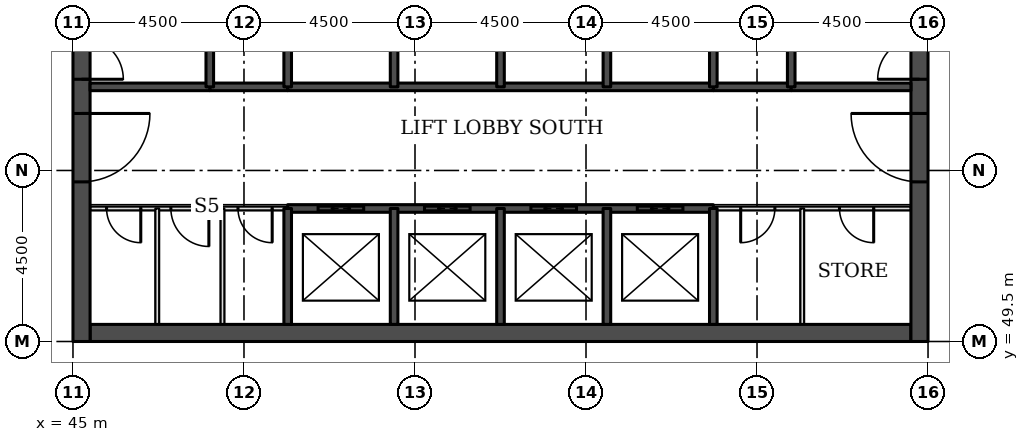
"""IFC4 building model, lengths in metres.
Left out: names, types, materials, properties, quantities, classifications, styles, units other than length and angle.
Written with IfcOpenShell. Run it as: python <this file> out.ifc"""

import sys

from ifc_helpers import new_model, si_unit, direction, frame, frame_2d, origin, place, context, subcontext, project, spatial, rectangle, extrude, element, fill, save


model = new_model("IFC4")
c1 = context("Model", 3, precision=1e-05, world=origin(), true_north=direction((0.0, 1.0)))
c2 = subcontext(c1, "Body", "Model", "MODEL_VIEW")
j1 = project(units=[si_unit("LENGTHUNIT", "METRE"), si_unit("PLANEANGLEUNIT", "RADIAN")], contexts=[c1])
p1 = place(None, origin())
s1 = spatial("IfcSite", under=j1, at=p1, CompositionType="ELEMENT")
p2 = place(p1, origin())
s2 = spatial("IfcBuilding", under=s1, at=p2, CompositionType="ELEMENT")
p3 = place(p2, frame((0.0, 0.0, 127.0)))
s3 = spatial("IfcBuildingStorey", under=s2, at=p3, CompositionType="ELEMENT", Elevation=127.0)
p4 = place(p3, frame((45.45, 49.725, 0.0), z_axis=(0.0, 0.0, 1.0), x_axis=(1.0, 0.0, 0.0)))
e1 = element("IfcWall", 1, at=p4, inside=s3, PredefinedType="SHEAR", context=c2, shape_type="SweptSolid", body=[
    extrude(rectangle(XDim=21.6, YDim=0.45, at=frame_2d((10.8, 0.0))), origin(), (0.0, 0.0, 1.0), 3.7),
])
p5 = place(p3, frame((45.225, 49.5, 0.0), z_axis=(0.0, 0.0, 1.0), x_axis=(0.0, 1.0, 0.0)))
e2 = element("IfcWall", 2, at=p5, inside=s3, PredefinedType="SHEAR", context=c2, shape_type="SweptSolid", body=[
    extrude(rectangle(XDim=22.5, YDim=0.45, at=frame_2d((11.25, 0.0))), origin(), (0.0, 0.0, 1.0), 3.7),
])
p6 = place(p5, frame((4.2, 0.0, 0.0)))
e3 = element("IfcOpeningElement", 3, at=p6, cuts=e2, PredefinedType="OPENING", context=c2, shape_type="SweptSolid", body=[
    extrude(rectangle(XDim=1.8, YDim=2.1, at=frame_2d((0.9, 1.05))), frame((0.0, 0.235, 0.0), z_axis=(0.0, -1.0, 0.0), x_axis=(1.0, 0.0, 0.0)), (0.0, 0.0, 1.0), 0.47),
])
p7 = place(p5, frame((6.9, 0.0, 0.0)))
e4 = element("IfcOpeningElement", 4, at=p7, cuts=e2, PredefinedType="OPENING", context=c2, shape_type="SweptSolid", body=[
    extrude(rectangle(XDim=1.1, YDim=2.1, at=frame_2d((0.55, 1.05))), frame((0.0, 0.235, 0.0), z_axis=(0.0, -1.0, 0.0), x_axis=(1.0, 0.0, 0.0)), (0.0, 0.0, 1.0), 0.47),
])
p8 = place(p5, frame((13.6, 0.0, 0.0)))
e5 = element("IfcOpeningElement", 5, at=p8, cuts=e2, PredefinedType="OPENING", context=c2, shape_type="SweptSolid", body=[
    extrude(rectangle(XDim=1.1, YDim=2.1, at=frame_2d((0.55, 1.05))), frame((0.0, 0.235, 0.0), z_axis=(0.0, -1.0, 0.0), x_axis=(1.0, 0.0, 0.0)), (0.0, 0.0, 1.0), 0.47),
])
p9 = place(p5, frame((16.5, 0.0, 0.0)))
e6 = element("IfcOpeningElement", 6, at=p9, cuts=e2, PredefinedType="OPENING", context=c2, shape_type="SweptSolid", body=[
    extrude(rectangle(XDim=1.8, YDim=2.1, at=frame_2d((0.9, 1.05))), frame((0.0, 0.235, 0.0), z_axis=(0.0, -1.0, 0.0), x_axis=(1.0, 0.0, 0.0)), (0.0, 0.0, 1.0), 0.47),
])
p10 = place(p3, frame((67.275, 49.5, 0.0), z_axis=(0.0, 0.0, 1.0), x_axis=(0.0, 1.0, 0.0)))
e7 = element("IfcWall", 7, at=p10, inside=s3, PredefinedType="SHEAR", context=c2, shape_type="SweptSolid", body=[
    extrude(rectangle(XDim=22.5, YDim=0.45, at=frame_2d((11.25, 0.0))), origin(), (0.0, 0.0, 1.0), 3.7),
])
p11 = place(p10, frame((4.2, 0.0, 0.0)))
e8 = element("IfcOpeningElement", 8, at=p11, cuts=e7, PredefinedType="OPENING", context=c2, shape_type="SweptSolid", body=[
    extrude(rectangle(XDim=1.8, YDim=2.1, at=frame_2d((0.9, 1.05))), frame((0.0, 0.235, 0.0), z_axis=(0.0, -1.0, 0.0), x_axis=(1.0, 0.0, 0.0)), (0.0, 0.0, 1.0), 0.47),
])
p12 = place(p10, frame((6.9, 0.0, 0.0)))
e9 = element("IfcOpeningElement", 9, at=p12, cuts=e7, PredefinedType="OPENING", context=c2, shape_type="SweptSolid", body=[
    extrude(rectangle(XDim=1.1, YDim=2.1, at=frame_2d((0.55, 1.05))), frame((0.0, 0.235, 0.0), z_axis=(0.0, -1.0, 0.0), x_axis=(1.0, 0.0, 0.0)), (0.0, 0.0, 1.0), 0.47),
])
p13 = place(p10, frame((13.6, 0.0, 0.0)))
e10 = element("IfcOpeningElement", 10, at=p13, cuts=e7, PredefinedType="OPENING", context=c2, shape_type="SweptSolid", body=[
    extrude(rectangle(XDim=1.1, YDim=2.1, at=frame_2d((0.55, 1.05))), frame((0.0, 0.235, 0.0), z_axis=(0.0, -1.0, 0.0), x_axis=(1.0, 0.0, 0.0)), (0.0, 0.0, 1.0), 0.47),
])
p14 = place(p10, frame((16.5, 0.0, 0.0)))
e11 = element("IfcOpeningElement", 11, at=p14, cuts=e7, PredefinedType="OPENING", context=c2, shape_type="SweptSolid", body=[
    extrude(rectangle(XDim=1.8, YDim=2.1, at=frame_2d((0.9, 1.05))), frame((0.0, 0.235, 0.0), z_axis=(0.0, -1.0, 0.0), x_axis=(1.0, 0.0, 0.0)), (0.0, 0.0, 1.0), 0.47),
])
p15 = place(p3, frame((45.45, 53.0, 0.0), z_axis=(0.0, 0.0, 1.0), x_axis=(1.0, 0.0, 0.0)))
e12 = element("IfcWall", 12, at=p15, inside=s3, PredefinedType="PARTITIONING", context=c2, shape_type="SweptSolid", body=[
    extrude(rectangle(XDim=5.2, YDim=0.1, at=frame_2d((2.6, 0.0))), origin(), (0.0, 0.0, 1.0), 3.55),
])
p16 = place(p15, frame((0.434, 0.0, 0.0)))
e13 = element("IfcOpeningElement", 13, at=p16, cuts=e12, PredefinedType="OPENING", context=c2, shape_type="SweptSolid", body=[
    extrude(rectangle(XDim=0.9, YDim=2.1, at=frame_2d((0.45, 1.05))), frame((0.0, 0.06, 0.0), z_axis=(0.0, -1.0, 0.0), x_axis=(1.0, 0.0, 0.0)), (0.0, 0.0, 1.0), 0.12),
])
p17 = place(p15, frame((2.126, 0.0, 0.0)))
e14 = element("IfcOpeningElement", 14, at=p17, cuts=e12, PredefinedType="OPENING", context=c2, shape_type="SweptSolid", body=[
    extrude(rectangle(XDim=1.0, YDim=2.1, at=frame_2d((0.5, 1.05))), frame((0.0, 0.06, 0.0), z_axis=(0.0, -1.0, 0.0), x_axis=(1.0, 0.0, 0.0)), (0.0, 0.0, 1.0), 0.12),
])
p18 = place(p15, frame((3.892, 0.0, 0.0)))
e15 = element("IfcOpeningElement", 15, at=p18, cuts=e12, PredefinedType="OPENING", context=c2, shape_type="SweptSolid", body=[
    extrude(rectangle(XDim=0.9, YDim=2.1, at=frame_2d((0.45, 1.05))), frame((0.0, 0.06, 0.0), z_axis=(0.0, -1.0, 0.0), x_axis=(1.0, 0.0, 0.0)), (0.0, 0.0, 1.0), 0.12),
])
p19 = place(p3, frame((61.85, 53.0, 0.0), z_axis=(0.0, 0.0, 1.0), x_axis=(1.0, 0.0, 0.0)))
e16 = element("IfcWall", 16, at=p19, inside=s3, PredefinedType="PARTITIONING", context=c2, shape_type="SweptSolid", body=[
    extrude(rectangle(XDim=5.2, YDim=0.1, at=frame_2d((2.6, 0.0))), origin(), (0.0, 0.0, 1.0), 3.55),
])
p20 = place(p19, frame((3.32, 0.0, 0.0)))
e17 = element("IfcOpeningElement", 17, at=p20, cuts=e16, PredefinedType="OPENING", context=c2, shape_type="SweptSolid", body=[
    extrude(rectangle(XDim=0.9, YDim=2.1, at=frame_2d((0.45, 1.05))), frame((0.0, 0.06, 0.0), z_axis=(0.0, -1.0, 0.0), x_axis=(1.0, 0.0, 0.0)), (0.0, 0.0, 1.0), 0.12),
])
p21 = place(p19, frame((0.72, 0.0, 0.0)))
e18 = element("IfcOpeningElement", 18, at=p21, cuts=e16, PredefinedType="OPENING", context=c2, shape_type="SweptSolid", body=[
    extrude(rectangle(XDim=0.9, YDim=2.1, at=frame_2d((0.45, 1.05))), frame((0.0, 0.06, 0.0), z_axis=(0.0, -1.0, 0.0), x_axis=(1.0, 0.0, 0.0)), (0.0, 0.0, 1.0), 0.12),
])
p22 = place(p3, frame((50.65, 53.0, 0.0), z_axis=(0.0, 0.0, 1.0), x_axis=(1.0, 0.0, 0.0)))
e19 = element("IfcWall", 19, at=p22, inside=s3, PredefinedType="SOLIDWALL", context=c2, shape_type="SweptSolid", body=[
    extrude(rectangle(XDim=11.2, YDim=0.2, at=frame_2d((5.6, 0.0))), origin(), (0.0, 0.0, 1.0), 3.55),
])
p23 = place(p22, frame((0.8, 0.0, 0.0)))
e20 = element("IfcOpeningElement", 20, at=p23, cuts=e19, PredefinedType="OPENING", context=c2, shape_type="SweptSolid", body=[
    extrude(rectangle(XDim=1.2, YDim=2.1, at=frame_2d((0.6, 1.05))), frame((0.0, 0.11, 0.0), z_axis=(0.0, -1.0, 0.0), x_axis=(1.0, 0.0, 0.0)), (0.0, 0.0, 1.0), 0.22),
])
p24 = place(p22, frame((3.6, 0.0, 0.0)))
e21 = element("IfcOpeningElement", 21, at=p24, cuts=e19, PredefinedType="OPENING", context=c2, shape_type="SweptSolid", body=[
    extrude(rectangle(XDim=1.2, YDim=2.1, at=frame_2d((0.6, 1.05))), frame((0.0, 0.11, 0.0), z_axis=(0.0, -1.0, 0.0), x_axis=(1.0, 0.0, 0.0)), (0.0, 0.0, 1.0), 0.22),
])
p25 = place(p22, frame((6.4, 0.0, 0.0)))
e22 = element("IfcOpeningElement", 22, at=p25, cuts=e19, PredefinedType="OPENING", context=c2, shape_type="SweptSolid", body=[
    extrude(rectangle(XDim=1.2, YDim=2.1, at=frame_2d((0.6, 1.05))), frame((0.0, 0.11, 0.0), z_axis=(0.0, -1.0, 0.0), x_axis=(1.0, 0.0, 0.0)), (0.0, 0.0, 1.0), 0.22),
])
p26 = place(p22, frame((9.2, 0.0, 0.0)))
e23 = element("IfcOpeningElement", 23, at=p26, cuts=e19, PredefinedType="OPENING", context=c2, shape_type="SweptSolid", body=[
    extrude(rectangle(XDim=1.2, YDim=2.1, at=frame_2d((0.6, 1.05))), frame((0.0, 0.11, 0.0), z_axis=(0.0, -1.0, 0.0), x_axis=(1.0, 0.0, 0.0)), (0.0, 0.0, 1.0), 0.22),
])
for number, where, z_axis, x_axis in (
    (24, (48.6, 56.2, 0.0), (0.0, 0.0, 1.0), (1.0, 0.0, 0.0)),
    (25, (61.85, 56.2, 0.0), (0.0, 0.0, 1.0), (1.0, 0.0, 0.0)),
):
    element("IfcWall", number, at=place(p3, frame(where, z_axis=z_axis, x_axis=x_axis)), inside=s3, PredefinedType="SOLIDWALL", context=c2, shape_type="SweptSolid", body=[
        extrude(rectangle(XDim=2.05, YDim=0.2, at=frame_2d((1.025, 0.0))), origin(), (0.0, 0.0, 1.0), 3.55),
    ])
p27 = place(p3, frame((45.45, 56.2, 0.0), z_axis=(0.0, 0.0, 1.0), x_axis=(1.0, 0.0, 0.0)))
e26 = element("IfcWall", 26, at=p27, inside=s3, PredefinedType="SOLIDWALL", context=c2, shape_type="SweptSolid", body=[
    extrude(rectangle(XDim=3.15, YDim=0.2, at=frame_2d((1.575, 0.0))), origin(), (0.0, 0.0, 1.0), 3.55),
])
p28 = place(p3, frame((50.65, 56.2, 0.0), z_axis=(0.0, 0.0, 1.0), x_axis=(1.0, 0.0, 0.0)))
e27 = element("IfcWall", 27, at=p28, inside=s3, PredefinedType="SOLIDWALL", context=c2, shape_type="SweptSolid", body=[
    extrude(rectangle(XDim=11.2, YDim=0.2, at=frame_2d((5.6, 0.0))), origin(), (0.0, 0.0, 1.0), 3.55),
])
p29 = place(p3, frame((63.9, 56.2, 0.0), z_axis=(0.0, 0.0, 1.0), x_axis=(1.0, 0.0, 0.0)))
e28 = element("IfcWall", 28, at=p29, inside=s3, PredefinedType="SOLIDWALL", context=c2, shape_type="SweptSolid", body=[
    extrude(rectangle(XDim=3.15, YDim=0.2, at=frame_2d((1.575, 0.0))), origin(), (0.0, 0.0, 1.0), 3.55),
])
p30 = place(p3, frame((47.218, 49.95, 0.0), z_axis=(0.0, 0.0, 1.0), x_axis=(0.0, 1.0, 0.0)))
e29 = element("IfcWall", 29, at=p30, inside=s3, PredefinedType="PARTITIONING", context=c2, shape_type="SweptSolid", body=[
    extrude(rectangle(XDim=3.05, YDim=0.1, at=frame_2d((1.525, 0.0))), origin(), (0.0, 0.0, 1.0), 3.55),
])
p31 = place(p3, frame((48.6, 56.2, 0.0), z_axis=(0.0, 0.0, 1.0), x_axis=(0.0, 1.0, 0.0)))
e30 = element("IfcWall", 30, at=p31, inside=s3, PredefinedType="SOLIDWALL", context=c2, shape_type="SweptSolid", body=[
    extrude(rectangle(XDim=5.8, YDim=0.2, at=frame_2d((2.9, 0.0))), origin(), (0.0, 0.0, 1.0), 3.55),
])
p32 = place(p3, frame((48.934, 49.95, 0.0), z_axis=(0.0, 0.0, 1.0), x_axis=(0.0, 1.0, 0.0)))
e31 = element("IfcWall", 31, at=p32, inside=s3, PredefinedType="PARTITIONING", context=c2, shape_type="SweptSolid", body=[
    extrude(rectangle(XDim=3.05, YDim=0.1, at=frame_2d((1.525, 0.0))), origin(), (0.0, 0.0, 1.0), 3.55),
])
p33 = place(p3, frame((50.65, 49.95, 0.0), z_axis=(0.0, 0.0, 1.0), x_axis=(0.0, 1.0, 0.0)))
e32 = element("IfcWall", 32, at=p33, inside=s3, PredefinedType="SOLIDWALL", context=c2, shape_type="SweptSolid", body=[
    extrude(rectangle(XDim=3.05, YDim=0.2, at=frame_2d((1.525, 0.0))), origin(), (0.0, 0.0, 1.0), 3.55),
])
p34 = place(p3, frame((50.65, 56.2, 0.0), z_axis=(0.0, 0.0, 1.0), x_axis=(0.0, 1.0, 0.0)))
e33 = element("IfcWall", 33, at=p34, inside=s3, PredefinedType="SOLIDWALL", context=c2, shape_type="SweptSolid", body=[
    extrude(rectangle(XDim=2.8, YDim=0.2, at=frame_2d((1.4, 0.0))), origin(), (0.0, 0.0, 1.0), 3.55),
])
p35 = place(p3, frame((53.45, 49.95, 0.0), z_axis=(0.0, 0.0, 1.0), x_axis=(0.0, 1.0, 0.0)))
e34 = element("IfcWall", 34, at=p35, inside=s3, PredefinedType="SOLIDWALL", context=c2, shape_type="SweptSolid", body=[
    extrude(rectangle(XDim=3.05, YDim=0.2, at=frame_2d((1.525, 0.0))), origin(), (0.0, 0.0, 1.0), 3.55),
])
p36 = place(p3, frame((53.45, 56.2, 0.0), z_axis=(0.0, 0.0, 1.0), x_axis=(0.0, 1.0, 0.0)))
e35 = element("IfcWall", 35, at=p36, inside=s3, PredefinedType="SOLIDWALL", context=c2, shape_type="SweptSolid", body=[
    extrude(rectangle(XDim=2.8, YDim=0.2, at=frame_2d((1.4, 0.0))), origin(), (0.0, 0.0, 1.0), 3.55),
])
p37 = place(p3, frame((56.25, 49.95, 0.0), z_axis=(0.0, 0.0, 1.0), x_axis=(0.0, 1.0, 0.0)))
e36 = element("IfcWall", 36, at=p37, inside=s3, PredefinedType="SOLIDWALL", context=c2, shape_type="SweptSolid", body=[
    extrude(rectangle(XDim=3.05, YDim=0.2, at=frame_2d((1.525, 0.0))), origin(), (0.0, 0.0, 1.0), 3.55),
])
p38 = place(p3, frame((56.25, 56.2, 0.0), z_axis=(0.0, 0.0, 1.0), x_axis=(0.0, 1.0, 0.0)))
e37 = element("IfcWall", 37, at=p38, inside=s3, PredefinedType="SOLIDWALL", context=c2, shape_type="SweptSolid", body=[
    extrude(rectangle(XDim=2.8, YDim=0.2, at=frame_2d((1.4, 0.0))), origin(), (0.0, 0.0, 1.0), 3.55),
])
p39 = place(p3, frame((59.05, 49.95, 0.0), z_axis=(0.0, 0.0, 1.0), x_axis=(0.0, 1.0, 0.0)))
e38 = element("IfcWall", 38, at=p39, inside=s3, PredefinedType="SOLIDWALL", context=c2, shape_type="SweptSolid", body=[
    extrude(rectangle(XDim=3.05, YDim=0.2, at=frame_2d((1.525, 0.0))), origin(), (0.0, 0.0, 1.0), 3.55),
])
p40 = place(p3, frame((59.05, 56.2, 0.0), z_axis=(0.0, 0.0, 1.0), x_axis=(0.0, 1.0, 0.0)))
e39 = element("IfcWall", 39, at=p40, inside=s3, PredefinedType="SOLIDWALL", context=c2, shape_type="SweptSolid", body=[
    extrude(rectangle(XDim=2.8, YDim=0.2, at=frame_2d((1.4, 0.0))), origin(), (0.0, 0.0, 1.0), 3.55),
])
p41 = place(p3, frame((61.85, 49.95, 0.0), z_axis=(0.0, 0.0, 1.0), x_axis=(0.0, 1.0, 0.0)))
e40 = element("IfcWall", 40, at=p41, inside=s3, PredefinedType="SOLIDWALL", context=c2, shape_type="SweptSolid", body=[
    extrude(rectangle(XDim=3.05, YDim=0.2, at=frame_2d((1.525, 0.0))), origin(), (0.0, 0.0, 1.0), 3.55),
])
p42 = place(p3, frame((61.85, 56.2, 0.0), z_axis=(0.0, 0.0, 1.0), x_axis=(0.0, 1.0, 0.0)))
e41 = element("IfcWall", 41, at=p42, inside=s3, PredefinedType="SOLIDWALL", context=c2, shape_type="SweptSolid", body=[
    extrude(rectangle(XDim=2.8, YDim=0.2, at=frame_2d((1.4, 0.0))), origin(), (0.0, 0.0, 1.0), 3.55),
])
p43 = place(p3, frame((63.9, 56.2, 0.0), z_axis=(0.0, 0.0, 1.0), x_axis=(0.0, 1.0, 0.0)))
e42 = element("IfcWall", 42, at=p43, inside=s3, PredefinedType="SOLIDWALL", context=c2, shape_type="SweptSolid", body=[
    extrude(rectangle(XDim=5.8, YDim=0.2, at=frame_2d((2.9, 0.0))), origin(), (0.0, 0.0, 1.0), 3.55),
])
p44 = place(p3, frame((64.19, 49.95, 0.0), z_axis=(0.0, 0.0, 1.0), x_axis=(0.0, 1.0, 0.0)))
e43 = element("IfcWall", 43, at=p44, inside=s3, PredefinedType="PARTITIONING", context=c2, shape_type="SweptSolid", body=[
    extrude(rectangle(XDim=3.05, YDim=0.1, at=frame_2d((1.525, 0.0))), origin(), (0.0, 0.0, 1.0), 3.55),
])
p45 = place(p23, origin())
e44 = element("IfcDoor", 44, at=p45, inside=s3, OperationType="DOUBLE_DOOR_SLIDING", PredefinedType="DOOR", context=c2, shape_type="SweptSolid", body=[
    extrude(rectangle(XDim=1.2, YDim=2.1, at=frame_2d((0.6, 1.05))), frame((0.0, 0.025, 0.0), z_axis=(0.0, -1.0, 0.0), x_axis=(1.0, 0.0, 0.0)), (0.0, 0.0, 1.0), 0.05),
])
fill(e20, e44)
p46 = place(p24, origin())
e45 = element("IfcDoor", 45, at=p46, inside=s3, OperationType="DOUBLE_DOOR_SLIDING", PredefinedType="DOOR", context=c2, shape_type="SweptSolid", body=[
    extrude(rectangle(XDim=1.2, YDim=2.1, at=frame_2d((0.6, 1.05))), frame((0.0, 0.025, 0.0), z_axis=(0.0, -1.0, 0.0), x_axis=(1.0, 0.0, 0.0)), (0.0, 0.0, 1.0), 0.05),
])
fill(e21, e45)
p47 = place(p25, origin())
e46 = element("IfcDoor", 46, at=p47, inside=s3, OperationType="DOUBLE_DOOR_SLIDING", PredefinedType="DOOR", context=c2, shape_type="SweptSolid", body=[
    extrude(rectangle(XDim=1.2, YDim=2.1, at=frame_2d((0.6, 1.05))), frame((0.0, 0.025, 0.0), z_axis=(0.0, -1.0, 0.0), x_axis=(1.0, 0.0, 0.0)), (0.0, 0.0, 1.0), 0.05),
])
fill(e22, e46)
p48 = place(p26, origin())
e47 = element("IfcDoor", 47, at=p48, inside=s3, OperationType="DOUBLE_DOOR_SLIDING", PredefinedType="DOOR", context=c2, shape_type="SweptSolid", body=[
    extrude(rectangle(XDim=1.2, YDim=2.1, at=frame_2d((0.6, 1.05))), frame((0.0, 0.025, 0.0), z_axis=(0.0, -1.0, 0.0), x_axis=(1.0, 0.0, 0.0)), (0.0, 0.0, 1.0), 0.05),
])
fill(e23, e47)
p49 = place(p6, frame((1.8, 0.0, 0.0), z_axis=(0.0, 0.0, 1.0), x_axis=(-1.0, 0.0, 0.0)))
e48 = element("IfcDoor", 48, at=p49, inside=s3, OperationType="SINGLE_SWING_LEFT", PredefinedType="DOOR", context=c2, shape_type="SweptSolid", body=[
    extrude(rectangle(XDim=1.8, YDim=2.1, at=frame_2d((0.9, 1.05))), frame((0.0, 0.025, 0.0), z_axis=(0.0, -1.0, 0.0), x_axis=(1.0, 0.0, 0.0)), (0.0, 0.0, 1.0), 0.05),
])
fill(e3, e48)
p50 = place(p7, frame((1.1, 0.0, 0.0), z_axis=(0.0, 0.0, 1.0), x_axis=(-1.0, 0.0, 0.0)))
e49 = element("IfcDoor", 49, at=p50, inside=s3, OperationType="SINGLE_SWING_RIGHT", PredefinedType="DOOR", context=c2, shape_type="SweptSolid", body=[
    extrude(rectangle(XDim=1.1, YDim=2.1, at=frame_2d((0.55, 1.05))), frame((0.0, 0.025, 0.0), z_axis=(0.0, -1.0, 0.0), x_axis=(1.0, 0.0, 0.0)), (0.0, 0.0, 1.0), 0.05),
])
fill(e4, e49)
p51 = place(p11, origin())
e50 = element("IfcDoor", 50, at=p51, inside=s3, OperationType="SINGLE_SWING_RIGHT", PredefinedType="DOOR", context=c2, shape_type="SweptSolid", body=[
    extrude(rectangle(XDim=1.8, YDim=2.1, at=frame_2d((0.9, 1.05))), frame((0.0, 0.025, 0.0), z_axis=(0.0, -1.0, 0.0), x_axis=(1.0, 0.0, 0.0)), (0.0, 0.0, 1.0), 0.05),
])
fill(e8, e50)
p52 = place(p12, origin())
e51 = element("IfcDoor", 51, at=p52, inside=s3, OperationType="SINGLE_SWING_LEFT", PredefinedType="DOOR", context=c2, shape_type="SweptSolid", body=[
    extrude(rectangle(XDim=1.1, YDim=2.1, at=frame_2d((0.55, 1.05))), frame((0.0, 0.025, 0.0), z_axis=(0.0, -1.0, 0.0), x_axis=(1.0, 0.0, 0.0)), (0.0, 0.0, 1.0), 0.05),
])
fill(e9, e51)
p53 = place(p20, frame((0.9, 0.0, 0.0), z_axis=(0.0, 0.0, 1.0), x_axis=(-1.0, 0.0, 0.0)))
e52 = element("IfcDoor", 52, at=p53, inside=s3, OperationType="SINGLE_SWING_LEFT", PredefinedType="DOOR", context=c2, shape_type="SweptSolid", body=[
    extrude(rectangle(XDim=0.9, YDim=2.1, at=frame_2d((0.45, 1.05))), frame((0.0, 0.025, 0.0), z_axis=(0.0, -1.0, 0.0), x_axis=(1.0, 0.0, 0.0)), (0.0, 0.0, 1.0), 0.05),
])
fill(e17, e52)
p54 = place(p21, frame((0.9, 0.0, 0.0), z_axis=(0.0, 0.0, 1.0), x_axis=(-1.0, 0.0, 0.0)))
e53 = element("IfcDoor", 53, at=p54, inside=s3, OperationType="SINGLE_SWING_RIGHT", PredefinedType="DOOR", context=c2, shape_type="SweptSolid", body=[
    extrude(rectangle(XDim=0.9, YDim=2.1, at=frame_2d((0.45, 1.05))), frame((0.0, 0.025, 0.0), z_axis=(0.0, -1.0, 0.0), x_axis=(1.0, 0.0, 0.0)), (0.0, 0.0, 1.0), 0.05),
])
fill(e18, e53)
p55 = place(p16, frame((0.9, 0.0, 0.0), z_axis=(0.0, 0.0, 1.0), x_axis=(-1.0, 0.0, 0.0)))
e54 = element("IfcDoor", 54, at=p55, inside=s3, OperationType="SINGLE_SWING_LEFT", PredefinedType="DOOR", context=c2, shape_type="SweptSolid", body=[
    extrude(rectangle(XDim=0.9, YDim=2.1, at=frame_2d((0.45, 1.05))), frame((0.0, 0.025, 0.0), z_axis=(0.0, -1.0, 0.0), x_axis=(1.0, 0.0, 0.0)), (0.0, 0.0, 1.0), 0.05),
])
fill(e13, e54)
p56 = place(p17, frame((1.0, 0.0, 0.0), z_axis=(0.0, 0.0, 1.0), x_axis=(-1.0, 0.0, 0.0)))
e55 = element("IfcDoor", 55, at=p56, inside=s3, OperationType="SINGLE_SWING_LEFT", PredefinedType="DOOR", context=c2, shape_type="SweptSolid", body=[
    extrude(rectangle(XDim=1.0, YDim=2.1, at=frame_2d((0.5, 1.05))), frame((0.0, 0.025, 0.0), z_axis=(0.0, -1.0, 0.0), x_axis=(1.0, 0.0, 0.0)), (0.0, 0.0, 1.0), 0.05),
])
fill(e14, e55)
p57 = place(p18, frame((0.9, 0.0, 0.0), z_axis=(0.0, 0.0, 1.0), x_axis=(-1.0, 0.0, 0.0)))
e56 = element("IfcDoor", 56, at=p57, inside=s3, OperationType="SINGLE_SWING_LEFT", PredefinedType="DOOR", context=c2, shape_type="SweptSolid", body=[
    extrude(rectangle(XDim=0.9, YDim=2.1, at=frame_2d((0.45, 1.05))), frame((0.0, 0.025, 0.0), z_axis=(0.0, -1.0, 0.0), x_axis=(1.0, 0.0, 0.0)), (0.0, 0.0, 1.0), 0.05),
])
fill(e15, e56)
save(model, sys.argv[1])
